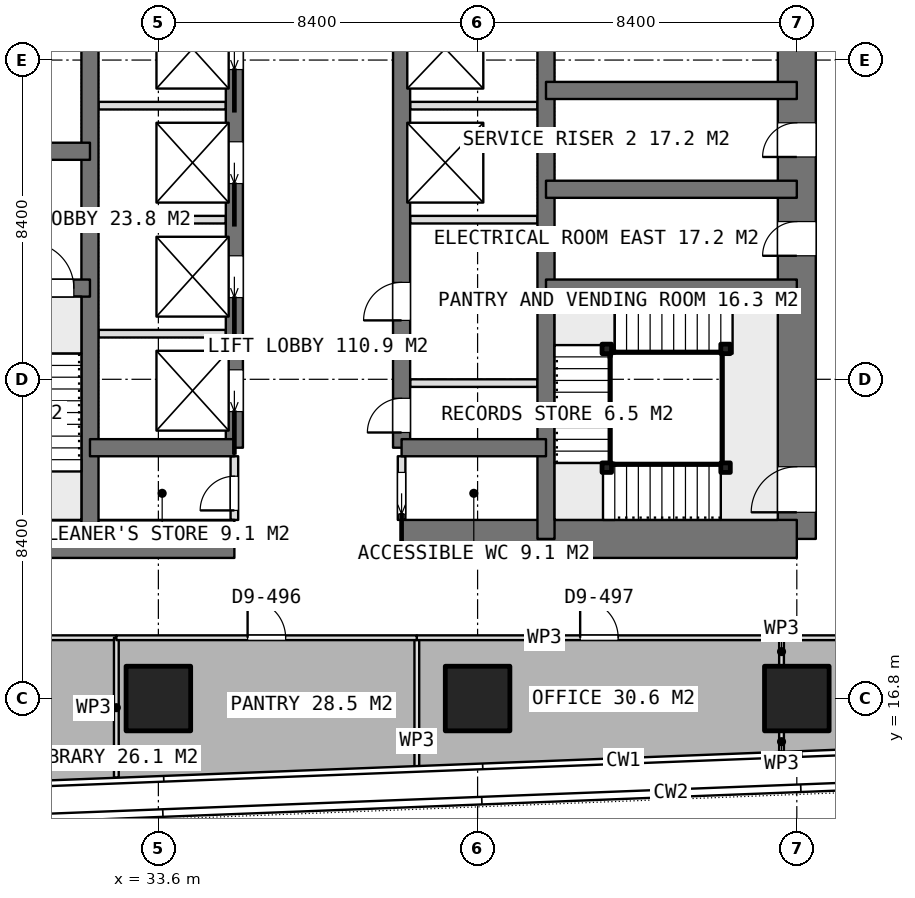
"""IFC4 building model, lengths in metres.
Left out: names, types, materials, properties, quantities, classifications, styles, units other than length and angle.
Written with IfcOpenShell. Run it as: python <this file> out.ifc"""

import sys

from ifc_helpers import new_model, si_unit, direction, frame, frame_2d, origin, origin_2d, place, context, subcontext, project, spatial, rectangle, extrude, element, fill, save


model = new_model("IFC4")
c1 = context("Model", 3, precision=1e-05, world=origin(), true_north=direction((0.0, 1.0)))
c2 = subcontext(c1, "Body", "Model", "MODEL_VIEW")
j1 = project(units=[si_unit("LENGTHUNIT", "METRE"), si_unit("PLANEANGLEUNIT", "RADIAN")], contexts=[c1])
p1 = place(None, origin())
s1 = spatial("IfcSite", under=j1, at=p1, CompositionType="ELEMENT")
p2 = place(p1, origin())
s2 = spatial("IfcBuilding", under=s1, at=p2, CompositionType="ELEMENT")
p3 = place(p2, frame((0.0, 0.0, 129.05)))
s3 = spatial("IfcBuildingStorey", under=s2, at=p3, CompositionType="ELEMENT", Elevation=129.05)
p4 = place(p3, frame((25.2, 21.0, 0.0), z_axis=(0.0, 0.0, 1.0), x_axis=(1.0, 0.0, 0.0)))
e1 = element("IfcWall", 1, at=p4, inside=s3, PredefinedType="SHEAR", context=c2, shape_type="SweptSolid", body=[
    extrude(rectangle(XDim=10.4, YDim=1.0, at=frame_2d((5.2, 0.0))), origin(), (0.0, 0.0, 1.0), 3.75),
])
p5 = place(p3, frame((40.0, 21.0, 0.0), z_axis=(0.0, 0.0, 1.0), x_axis=(1.0, 0.0, 0.0)))
e2 = element("IfcWall", 2, at=p5, inside=s3, PredefinedType="SHEAR", context=c2, shape_type="SweptSolid", body=[
    extrude(rectangle(XDim=10.4, YDim=1.0, at=frame_2d((5.2, 0.0))), origin(), (0.0, 0.0, 1.0), 3.75),
])
p6 = place(p3, frame((50.4, 21.0, 0.0), z_axis=(0.0, 0.0, 1.0), x_axis=(0.0, 1.0, 0.0)))
e3 = element("IfcWall", 3, at=p6, inside=s3, PredefinedType="SHEAR", context=c2, shape_type="SweptSolid", body=[
    extrude(rectangle(XDim=25.2, YDim=1.0, at=frame_2d((12.6, 0.0))), origin(), (0.0, 0.0, 1.0), 3.75),
])
p7 = place(p6, frame((16.2, 0.0, 0.0)))
e4 = element("IfcOpeningElement", 4, at=p7, cuts=e3, PredefinedType="OPENING", context=c2, shape_type="SweptSolid", body=[
    extrude(rectangle(XDim=1.2, YDim=2.1, at=frame_2d((0.6, 1.05))), frame((0.0, 0.51, 0.0), z_axis=(0.0, -1.0, 0.0), x_axis=(1.0, 0.0, 0.0)), (0.0, 0.0, 1.0), 1.02),
])
p8 = place(p6, frame((10.05, 0.0, 0.0)))
e5 = element("IfcOpeningElement", 5, at=p8, cuts=e3, PredefinedType="OPENING", context=c2, shape_type="SweptSolid", body=[
    extrude(rectangle(XDim=0.9, YDim=2.1, at=frame_2d((0.45, 1.05))), frame((0.0, 0.51, 0.0), z_axis=(0.0, -1.0, 0.0), x_axis=(1.0, 0.0, 0.0)), (0.0, 0.0, 1.0), 1.02),
])
p9 = place(p6, frame((7.45, 0.0, 0.0)))
e6 = element("IfcOpeningElement", 6, at=p9, cuts=e3, PredefinedType="OPENING", context=c2, shape_type="SweptSolid", body=[
    extrude(rectangle(XDim=0.9, YDim=2.1, at=frame_2d((0.45, 1.05))), frame((0.0, 0.51, 0.0), z_axis=(0.0, -1.0, 0.0), x_axis=(1.0, 0.0, 0.0)), (0.0, 0.0, 1.0), 1.02),
])
p10 = place(p6, frame((0.7, 0.0, 0.0)))
e7 = element("IfcOpeningElement", 7, at=p10, cuts=e3, PredefinedType="OPENING", context=c2, shape_type="SweptSolid", body=[
    extrude(rectangle(XDim=1.2, YDim=2.1, at=frame_2d((0.6, 1.05))), frame((0.0, 0.51, 0.0), z_axis=(0.0, -1.0, 0.0), x_axis=(1.0, 0.0, 0.0)), (0.0, 0.0, 1.0), 1.02),
])
for number, where, z_axis, x_axis in (
    (8, (31.8, 21.0, 0.0), (0.0, 0.0, 1.0), (0.0, 1.0, 0.0)),
    (9, (43.8, 21.0, 0.0), (0.0, 0.0, 1.0), (0.0, 1.0, 0.0)),
):
    element("IfcWall", number, at=place(p3, frame(where, z_axis=z_axis, x_axis=x_axis)), inside=s3, PredefinedType="SHEAR", context=c2, shape_type="SweptSolid", body=[
        extrude(rectangle(XDim=25.2, YDim=0.45, at=frame_2d((12.6, 0.0))), origin(), (0.0, 0.0, 1.0), 3.75),
    ])
p11 = place(p3, frame((35.6, 23.4, 0.0), z_axis=(0.0, 0.0, 1.0), x_axis=(0.0, 1.0, 0.0)))
e10 = element("IfcWall", 10, at=p11, inside=s3, PredefinedType="SHEAR", context=c2, shape_type="SweptSolid", body=[
    extrude(rectangle(XDim=18.0, YDim=0.45, at=frame_2d((9.0, 0.0))), origin(), (0.0, 0.0, 1.0), 3.75),
])
p12 = place(p11, frame((0.95, 0.0, 0.0)))
e11 = element("IfcOpeningElement", 11, at=p12, cuts=e10, PredefinedType="OPENING", context=c2, shape_type="SweptSolid", body=[
    extrude(rectangle(XDim=1.1, YDim=2.1, at=frame_2d((0.55, 1.05))), frame((0.0, 0.235, 0.0), z_axis=(0.0, -1.0, 0.0), x_axis=(1.0, 0.0, 0.0)), (0.0, 0.0, 1.0), 0.47),
])
p13 = place(p11, frame((3.95, 0.0, 0.0)))
e12 = element("IfcOpeningElement", 12, at=p13, cuts=e10, PredefinedType="OPENING", context=c2, shape_type="SweptSolid", body=[
    extrude(rectangle(XDim=1.1, YDim=2.1, at=frame_2d((0.55, 1.05))), frame((0.0, 0.235, 0.0), z_axis=(0.0, -1.0, 0.0), x_axis=(1.0, 0.0, 0.0)), (0.0, 0.0, 1.0), 0.47),
])
p14 = place(p11, frame((6.95, 0.0, 0.0)))
e13 = element("IfcOpeningElement", 13, at=p14, cuts=e10, PredefinedType="OPENING", context=c2, shape_type="SweptSolid", body=[
    extrude(rectangle(XDim=1.1, YDim=2.1, at=frame_2d((0.55, 1.05))), frame((0.0, 0.235, 0.0), z_axis=(0.0, -1.0, 0.0), x_axis=(1.0, 0.0, 0.0)), (0.0, 0.0, 1.0), 0.47),
])
p15 = place(p11, frame((9.95, 0.0, 0.0)))
e14 = element("IfcOpeningElement", 14, at=p15, cuts=e10, PredefinedType="OPENING", context=c2, shape_type="SweptSolid", body=[
    extrude(rectangle(XDim=1.1, YDim=2.1, at=frame_2d((0.55, 1.05))), frame((0.0, 0.235, 0.0), z_axis=(0.0, -1.0, 0.0), x_axis=(1.0, 0.0, 0.0)), (0.0, 0.0, 1.0), 0.47),
])
p16 = place(p11, frame((12.95, 0.0, 0.0)))
e15 = element("IfcOpeningElement", 15, at=p16, cuts=e10, PredefinedType="OPENING", context=c2, shape_type="SweptSolid", body=[
    extrude(rectangle(XDim=1.1, YDim=2.1, at=frame_2d((0.55, 1.05))), frame((0.0, 0.235, 0.0), z_axis=(0.0, -1.0, 0.0), x_axis=(1.0, 0.0, 0.0)), (0.0, 0.0, 1.0), 0.47),
])
p17 = place(p11, frame((15.95, 0.0, 0.0)))
e16 = element("IfcOpeningElement", 16, at=p17, cuts=e10, PredefinedType="OPENING", context=c2, shape_type="SweptSolid", body=[
    extrude(rectangle(XDim=1.1, YDim=2.1, at=frame_2d((0.55, 1.05))), frame((0.0, 0.235, 0.0), z_axis=(0.0, -1.0, 0.0), x_axis=(1.0, 0.0, 0.0)), (0.0, 0.0, 1.0), 0.47),
])
p18 = place(p3, frame((40.0, 23.4, 0.0), z_axis=(0.0, 0.0, 1.0), x_axis=(0.0, 1.0, 0.0)))
e17 = element("IfcWall", 17, at=p18, inside=s3, PredefinedType="SHEAR", context=c2, shape_type="SweptSolid", body=[
    extrude(rectangle(XDim=18.0, YDim=0.45, at=frame_2d((9.0, 0.0))), origin(), (0.0, 0.0, 1.0), 3.75),
])
p19 = place(p18, frame((0.4, 0.0, 0.0)))
e18 = element("IfcOpeningElement", 18, at=p19, cuts=e17, PredefinedType="OPENING", context=c2, shape_type="SweptSolid", body=[
    extrude(rectangle(XDim=0.9, YDim=2.1, at=frame_2d((0.45, 1.05))), frame((0.0, 0.235, 0.0), z_axis=(0.0, -1.0, 0.0), x_axis=(1.0, 0.0, 0.0)), (0.0, 0.0, 1.0), 0.47),
])
p20 = place(p18, frame((3.35, 0.0, 0.0)))
e19 = element("IfcOpeningElement", 19, at=p20, cuts=e17, PredefinedType="OPENING", context=c2, shape_type="SweptSolid", body=[
    extrude(rectangle(XDim=1.0, YDim=2.1, at=frame_2d((0.5, 1.05))), frame((0.0, 0.235, 0.0), z_axis=(0.0, -1.0, 0.0), x_axis=(1.0, 0.0, 0.0)), (0.0, 0.0, 1.0), 0.47),
])
for number, where, z_axis, x_axis in (
    (20, (31.8, 23.4, 0.0), (0.0, 0.0, 1.0), (1.0, 0.0, 0.0)),
    (21, (40.0, 23.4, 0.0), (0.0, 0.0, 1.0), (1.0, 0.0, 0.0)),
):
    element("IfcWall", number, at=place(p3, frame(where, z_axis=z_axis, x_axis=x_axis)), inside=s3, PredefinedType="SHEAR", context=c2, shape_type="SweptSolid", body=[
        extrude(rectangle(XDim=3.8, YDim=0.45, at=frame_2d((1.9, 0.0))), origin(), (0.0, 0.0, 1.0), 3.75),
    ])
p21 = place(p3, frame((25.2, 27.6, 0.0), z_axis=(0.0, 0.0, 1.0), x_axis=(1.0, 0.0, 0.0)))
e22 = element("IfcWall", 22, at=p21, inside=s3, PredefinedType="SHEAR", context=c2, shape_type="SweptSolid", body=[
    extrude(rectangle(XDim=6.6, YDim=0.45, at=frame_2d((3.3, 0.0))), origin(), (0.0, 0.0, 1.0), 3.75),
])
p22 = place(p21, frame((4.975, 0.0, 0.0)))
e23 = element("IfcOpeningElement", 23, at=p22, cuts=e22, PredefinedType="OPENING", context=c2, shape_type="SweptSolid", body=[
    extrude(rectangle(XDim=1.2, YDim=2.1, at=frame_2d((0.6, 1.05))), frame((0.0, 0.235, 0.0), z_axis=(0.0, -1.0, 0.0), x_axis=(1.0, 0.0, 0.0)), (0.0, 0.0, 1.0), 0.47),
])
p23 = place(p3, frame((25.2, 31.2, 0.0), z_axis=(0.0, 0.0, 1.0), x_axis=(1.0, 0.0, 0.0)))
e24 = element("IfcWall", 24, at=p23, inside=s3, PredefinedType="SHEAR", context=c2, shape_type="SweptSolid", body=[
    extrude(rectangle(XDim=6.6, YDim=0.45, at=frame_2d((3.3, 0.0))), origin(), (0.0, 0.0, 1.0), 3.75),
])
p24 = place(p23, frame((2.65, 0.0, 0.0)))
e25 = element("IfcOpeningElement", 25, at=p24, cuts=e24, PredefinedType="OPENING", context=c2, shape_type="SweptSolid", body=[
    extrude(rectangle(XDim=1.3, YDim=2.1, at=frame_2d((0.65, 1.05))), frame((0.0, 0.235, 0.0), z_axis=(0.0, -1.0, 0.0), x_axis=(1.0, 0.0, 0.0)), (0.0, 0.0, 1.0), 0.47),
])
for number, where, z_axis, x_axis in (
    (26, (43.8, 27.6, 0.0), (0.0, 0.0, 1.0), (1.0, 0.0, 0.0)),
    (27, (43.8, 30.2, 0.0), (0.0, 0.0, 1.0), (1.0, 0.0, 0.0)),
    (28, (43.8, 32.8, 0.0), (0.0, 0.0, 1.0), (1.0, 0.0, 0.0)),
):
    element("IfcWall", number, at=place(p3, frame(where, z_axis=z_axis, x_axis=x_axis)), inside=s3, PredefinedType="SHEAR", context=c2, shape_type="SweptSolid", body=[
        extrude(rectangle(XDim=6.6, YDim=0.45, at=frame_2d((3.3, 0.0))), origin(), (0.0, 0.0, 1.0), 3.75),
    ])
for number, where, z_axis, x_axis in (
    (29, (33.6, 16.8, 0.0), (0.0, 0.0, 1.0), (1.0, 0.0, 0.0)),
    (30, (42.0, 16.8, 0.0), (0.0, 0.0, 1.0), (1.0, 0.0, 0.0)),
    (31, (50.4, 16.8, 0.0), (0.0, 0.0, 1.0), (1.0, 0.0, 0.0)),
):
    element("IfcColumn", number, at=place(p3, frame(where, z_axis=z_axis, x_axis=x_axis)), inside=s3, PredefinedType="COLUMN", context=c2, shape_type="SweptSolid", body=[
        extrude(rectangle(XDim=1.7, YDim=1.7, at=origin_2d()), origin(), (0.0, 0.0, 1.0), 3.75),
    ])
for number, where, z_axis, x_axis in (
    (32, (32.025, 26.4, 0.0), (0.0, 0.0, 1.0), (1.0, 0.0, 0.0)),
    (33, (32.025, 29.4, 0.0), (0.0, 0.0, 1.0), (1.0, 0.0, 0.0)),
    (34, (32.025, 32.4, 0.0), (0.0, 0.0, 1.0), (1.0, 0.0, 0.0)),
):
    element("IfcWall", number, at=place(p3, frame(where, z_axis=z_axis, x_axis=x_axis)), inside=s3, PredefinedType="PARTITIONING", context=c2, shape_type="SweptSolid", body=[
        extrude(rectangle(XDim=3.35, YDim=0.2, at=frame_2d((1.675, 0.0))), origin(), (0.0, 0.0, 1.0), 3.5),
    ])
for number, where, z_axis, x_axis in (
    (35, (40.225, 29.4, 0.0), (0.0, 0.0, 1.0), (1.0, 0.0, 0.0)),
    (36, (40.225, 32.4, 0.0), (0.0, 0.0, 1.0), (1.0, 0.0, 0.0)),
):
    element("IfcWall", number, at=place(p3, frame(where, z_axis=z_axis, x_axis=x_axis)), inside=s3, PredefinedType="PARTITIONING", context=c2, shape_type="SweptSolid", body=[
        extrude(rectangle(XDim=3.35, YDim=0.2, at=frame_2d((1.675, 0.0))), origin(), (0.0, 0.0, 1.0), 3.5),
    ])
p25 = place(p3, frame((40.0, 21.5, 0.0), z_axis=(0.0, 0.0, 1.0), x_axis=(0.0, 1.0, 0.0)))
e37 = element("IfcWall", 37, at=p25, inside=s3, PredefinedType="PARTITIONING", context=c2, shape_type="SweptSolid", body=[
    extrude(rectangle(XDim=1.675, YDim=0.2, at=frame_2d((0.837, 0.0))), origin(), (0.0, 0.0, 1.0), 3.5),
])
p26 = place(p25, frame((0.15, 0.0, 0.0)))
e38 = element("IfcOpeningElement", 38, at=p26, cuts=e37, PredefinedType="OPENING", context=c2, shape_type="SweptSolid", body=[
    extrude(rectangle(XDim=1.1, YDim=2.1, at=frame_2d((0.55, 1.05))), frame((0.0, 0.11, 0.0), z_axis=(0.0, -1.0, 0.0), x_axis=(1.0, 0.0, 0.0)), (0.0, 0.0, 1.0), 0.22),
])
p27 = place(p3, frame((35.6, 21.5, 0.0), z_axis=(0.0, 0.0, 1.0), x_axis=(0.0, 1.0, 0.0)))
e39 = element("IfcWall", 39, at=p27, inside=s3, PredefinedType="PARTITIONING", context=c2, shape_type="SweptSolid", body=[
    extrude(rectangle(XDim=1.675, YDim=0.2, at=frame_2d((0.837, 0.0))), origin(), (0.0, 0.0, 1.0), 3.5),
])
p28 = place(p27, frame((0.25, 0.0, 0.0)))
e40 = element("IfcOpeningElement", 40, at=p28, cuts=e39, PredefinedType="OPENING", context=c2, shape_type="SweptSolid", body=[
    extrude(rectangle(XDim=0.9, YDim=2.1, at=frame_2d((0.45, 1.05))), frame((0.0, 0.11, 0.0), z_axis=(0.0, -1.0, 0.0), x_axis=(1.0, 0.0, 0.0)), (0.0, 0.0, 1.0), 0.22),
])
p29 = place(p3, frame((40.225, 25.1, 0.0), z_axis=(0.0, 0.0, 1.0), x_axis=(1.0, 0.0, 0.0)))
e41 = element("IfcWall", 41, at=p29, inside=s3, PredefinedType="PARTITIONING", context=c2, shape_type="SweptSolid", body=[
    extrude(rectangle(XDim=3.35, YDim=0.2, at=frame_2d((1.675, 0.0))), origin(), (0.0, 0.0, 1.0), 3.5),
])
p30 = place(p3, frame((40.401, 14.998, 0.0), z_axis=(0.0, 0.0, 1.0), x_axis=(0.0, 1.0, 0.0)))
e42 = element("IfcWall", 42, at=p30, inside=s3, PredefinedType="PARTITIONING", context=c2, shape_type="SweptSolid", body=[
    extrude(rectangle(XDim=3.402, YDim=0.125, at=frame_2d((1.701, 0.0))), origin(), (0.0, 0.0, 1.0), 3.5),
])
p31 = place(p3, frame((40.401, 18.4, 0.0), z_axis=(0.0, 0.0, 1.0), x_axis=(1.0, 0.0, 0.0)))
e43 = element("IfcWall", 43, at=p31, inside=s3, PredefinedType="PARTITIONING", context=c2, shape_type="SweptSolid", body=[
    extrude(rectangle(XDim=9.597, YDim=0.125, at=frame_2d((4.799, 0.0))), origin(), (0.0, 0.0, 1.0), 3.5),
])
p32 = place(p31, frame((4.298, 0.0, 0.0)))
e44 = element("IfcOpeningElement", 44, at=p32, cuts=e43, PredefinedType="OPENING", context=c2, shape_type="SweptSolid", body=[
    extrude(rectangle(XDim=1.0, YDim=2.1, at=frame_2d((0.5, 1.05))), frame((0.0, 0.073, 0.0), z_axis=(0.0, -1.0, 0.0), x_axis=(1.0, 0.0, 0.0)), (0.0, 0.0, 1.0), 0.145),
])
p33 = place(p3, frame((49.998, 18.4, 0.0), z_axis=(0.0, 0.0, 1.0), x_axis=(0.0, -1.0, 0.0)))
e45 = element("IfcWall", 45, at=p33, inside=s3, PredefinedType="PARTITIONING", context=c2, shape_type="SweptSolid", body=[
    extrude(rectangle(XDim=0.73, YDim=0.125, at=frame_2d((0.365, 0.0))), origin(), (0.0, 0.0, 1.0), 3.5),
])
p34 = place(p3, frame((49.998, 15.93, 0.0), z_axis=(0.0, 0.0, 1.0), x_axis=(0.0, -1.0, 0.0)))
e46 = element("IfcWall", 46, at=p34, inside=s3, PredefinedType="PARTITIONING", context=c2, shape_type="SweptSolid", body=[
    extrude(rectangle(XDim=0.529, YDim=0.125, at=frame_2d((0.265, 0.0))), origin(), (0.0, 0.0, 1.0), 3.5),
])
p35 = place(p3, frame((49.998, 18.4, 0.0), z_axis=(0.0, 0.0, 1.0), x_axis=(1.0, 0.0, 0.0)))
e47 = element("IfcWall", 47, at=p35, inside=s3, PredefinedType="PARTITIONING", context=c2, shape_type="SweptSolid", body=[
    extrude(rectangle(XDim=6.402, YDim=0.125, at=frame_2d((3.201, 0.0))), origin(), (0.0, 0.0, 1.0), 3.5),
])
p36 = place(p35, frame((2.301, 0.0, 0.0)))
e48 = element("IfcOpeningElement", 48, at=p36, cuts=e47, PredefinedType="OPENING", context=c2, shape_type="SweptSolid", body=[
    extrude(rectangle(XDim=1.8, YDim=2.1, at=frame_2d((0.9, 1.05))), frame((0.0, 0.073, 0.0), z_axis=(0.0, -1.0, 0.0), x_axis=(1.0, 0.0, 0.0)), (0.0, 0.0, 1.0), 0.145),
])
p37 = place(p3, frame((25.601, 18.4, 0.0), z_axis=(0.0, 0.0, 1.0), x_axis=(1.0, 0.0, 0.0)))
e49 = element("IfcWall", 49, at=p37, inside=s3, PredefinedType="PARTITIONING", context=c2, shape_type="SweptSolid", body=[
    extrude(rectangle(XDim=6.893, YDim=0.125, at=frame_2d((3.446, 0.0))), origin(), (0.0, 0.0, 1.0), 3.5),
])
p38 = place(p37, frame((2.947, 0.0, 0.0)))
e50 = element("IfcOpeningElement", 50, at=p38, cuts=e49, PredefinedType="OPENING", context=c2, shape_type="SweptSolid", body=[
    extrude(rectangle(XDim=1.0, YDim=2.1, at=frame_2d((0.5, 1.05))), frame((0.0, 0.073, 0.0), z_axis=(0.0, -1.0, 0.0), x_axis=(1.0, 0.0, 0.0)), (0.0, 0.0, 1.0), 0.145),
])
p39 = place(p3, frame((32.494, 18.4, 0.0), z_axis=(0.0, 0.0, 1.0), x_axis=(0.0, -1.0, 0.0)))
e51 = element("IfcWall", 51, at=p39, inside=s3, PredefinedType="PARTITIONING", context=c2, shape_type="SweptSolid", body=[
    extrude(rectangle(XDim=3.68, YDim=0.125, at=frame_2d((1.84, 0.0))), origin(), (0.0, 0.0, 1.0), 3.5),
])
p40 = place(p3, frame((32.495, 18.4, 0.0), z_axis=(0.0, 0.0, 1.0), x_axis=(1.0, 0.0, 0.0)))
e52 = element("IfcWall", 52, at=p40, inside=s3, PredefinedType="PARTITIONING", context=c2, shape_type="SweptSolid", body=[
    extrude(rectangle(XDim=7.905, YDim=0.125, at=frame_2d((3.952, 0.0))), origin(), (0.0, 0.0, 1.0), 3.5),
])
p41 = place(p40, frame((3.453, 0.0, 0.0)))
e53 = element("IfcOpeningElement", 53, at=p41, cuts=e52, PredefinedType="OPENING", context=c2, shape_type="SweptSolid", body=[
    extrude(rectangle(XDim=1.0, YDim=2.1, at=frame_2d((0.5, 1.05))), frame((0.0, 0.073, 0.0), z_axis=(0.0, -1.0, 0.0), x_axis=(1.0, 0.0, 0.0)), (0.0, 0.0, 1.0), 0.145),
])
for number, where, z_axis, x_axis in (
    (54, (48.525, 22.875, 0.0), (0.0, 0.0, 1.0), (1.0, 0.0, 0.0)),
    (55, (45.4, 22.875, 0.0), (0.0, 0.0, 1.0), (1.0, 0.0, 0.0)),
    (56, (45.4, 26.0, 0.0), (0.0, 0.0, 1.0), (1.0, 0.0, 0.0)),
    (57, (48.525, 26.0, 0.0), (0.0, 0.0, 1.0), (1.0, 0.0, 0.0)),
):
    element("IfcColumn", number, at=place(p3, frame(where, z_axis=z_axis, x_axis=x_axis)), inside=s3, PredefinedType="COLUMN", context=c2, shape_type="SweptSolid", body=[
        extrude(rectangle(XDim=0.25, YDim=0.25, at=origin_2d()), origin(), (0.0, 0.0, 1.0), 3.75),
    ])
p42 = place(p8, origin())
e58 = element("IfcDoor", 58, at=p42, inside=s3, OperationType="SINGLE_SWING_LEFT", PredefinedType="DOOR", context=c2, shape_type="SweptSolid", body=[
    extrude(rectangle(XDim=0.9, YDim=2.1, at=frame_2d((0.45, 1.05))), frame((0.0, 0.025, 0.0), z_axis=(0.0, -1.0, 0.0), x_axis=(1.0, 0.0, 0.0)), (0.0, 0.0, 1.0), 0.05),
])
fill(e5, e58)
p43 = place(p9, origin())
e59 = element("IfcDoor", 59, at=p43, inside=s3, OperationType="SINGLE_SWING_LEFT", PredefinedType="DOOR", context=c2, shape_type="SweptSolid", body=[
    extrude(rectangle(XDim=0.9, YDim=2.1, at=frame_2d((0.45, 1.05))), frame((0.0, 0.025, 0.0), z_axis=(0.0, -1.0, 0.0), x_axis=(1.0, 0.0, 0.0)), (0.0, 0.0, 1.0), 0.05),
])
fill(e6, e59)
p44 = place(p26, origin())
e60 = element("IfcDoor", 60, at=p44, inside=s3, OperationType="SLIDING_TO_LEFT", PredefinedType="DOOR", context=c2, shape_type="SweptSolid", body=[
    extrude(rectangle(XDim=1.1, YDim=2.1, at=frame_2d((0.55, 1.05))), frame((0.0, 0.025, 0.0), z_axis=(0.0, -1.0, 0.0), x_axis=(1.0, 0.0, 0.0)), (0.0, 0.0, 1.0), 0.05),
])
fill(e38, e60)
p45 = place(p28, origin())
e61 = element("IfcDoor", 61, at=p45, inside=s3, OperationType="SINGLE_SWING_LEFT", PredefinedType="DOOR", context=c2, shape_type="SweptSolid", body=[
    extrude(rectangle(XDim=0.9, YDim=2.1, at=frame_2d((0.45, 1.05))), frame((0.0, 0.025, 0.0), z_axis=(0.0, -1.0, 0.0), x_axis=(1.0, 0.0, 0.0)), (0.0, 0.0, 1.0), 0.05),
])
fill(e40, e61)
p46 = place(p19, origin())
e62 = element("IfcDoor", 62, at=p46, inside=s3, OperationType="SINGLE_SWING_LEFT", PredefinedType="DOOR", context=c2, shape_type="SweptSolid", body=[
    extrude(rectangle(XDim=0.9, YDim=2.1, at=frame_2d((0.45, 1.05))), frame((0.0, 0.025, 0.0), z_axis=(0.0, -1.0, 0.0), x_axis=(1.0, 0.0, 0.0)), (0.0, 0.0, 1.0), 0.05),
])
fill(e18, e62)
p47 = place(p20, origin())
e63 = element("IfcDoor", 63, at=p47, inside=s3, OperationType="SINGLE_SWING_LEFT", PredefinedType="DOOR", context=c2, shape_type="SweptSolid", body=[
    extrude(rectangle(XDim=1.0, YDim=2.1, at=frame_2d((0.5, 1.05))), frame((0.0, 0.025, 0.0), z_axis=(0.0, -1.0, 0.0), x_axis=(1.0, 0.0, 0.0)), (0.0, 0.0, 1.0), 0.05),
])
fill(e19, e63)
p48 = place(p12, origin())
e64 = element("IfcDoor", 64, at=p48, inside=s3, OperationType="SLIDING_TO_LEFT", PredefinedType="USERDEFINED", context=c2, shape_type="SweptSolid", body=[
    extrude(rectangle(XDim=1.1, YDim=2.1, at=frame_2d((0.55, 1.05))), frame((0.0, 0.025, 0.0), z_axis=(0.0, -1.0, 0.0), x_axis=(1.0, 0.0, 0.0)), (0.0, 0.0, 1.0), 0.05),
])
fill(e11, e64)
p49 = place(p13, origin())
e65 = element("IfcDoor", 65, at=p49, inside=s3, OperationType="SLIDING_TO_LEFT", PredefinedType="USERDEFINED", context=c2, shape_type="SweptSolid", body=[
    extrude(rectangle(XDim=1.1, YDim=2.1, at=frame_2d((0.55, 1.05))), frame((0.0, 0.025, 0.0), z_axis=(0.0, -1.0, 0.0), x_axis=(1.0, 0.0, 0.0)), (0.0, 0.0, 1.0), 0.05),
])
fill(e12, e65)
p50 = place(p14, origin())
e66 = element("IfcDoor", 66, at=p50, inside=s3, OperationType="SLIDING_TO_LEFT", PredefinedType="USERDEFINED", context=c2, shape_type="SweptSolid", body=[
    extrude(rectangle(XDim=1.1, YDim=2.1, at=frame_2d((0.55, 1.05))), frame((0.0, 0.025, 0.0), z_axis=(0.0, -1.0, 0.0), x_axis=(1.0, 0.0, 0.0)), (0.0, 0.0, 1.0), 0.05),
])
fill(e13, e66)
p51 = place(p15, origin())
e67 = element("IfcDoor", 67, at=p51, inside=s3, OperationType="SLIDING_TO_LEFT", PredefinedType="USERDEFINED", context=c2, shape_type="SweptSolid", body=[
    extrude(rectangle(XDim=1.1, YDim=2.1, at=frame_2d((0.55, 1.05))), frame((0.0, 0.025, 0.0), z_axis=(0.0, -1.0, 0.0), x_axis=(1.0, 0.0, 0.0)), (0.0, 0.0, 1.0), 0.05),
])
fill(e14, e67)
p52 = place(p32, origin())
e68 = element("IfcDoor", 68, at=p52, inside=s3, OperationType="SINGLE_SWING_LEFT", PredefinedType="DOOR", context=c2, shape_type="SweptSolid", body=[
    extrude(rectangle(XDim=1.0, YDim=2.1, at=frame_2d((0.5, 1.05))), frame((0.0, 0.025, 0.0), z_axis=(0.0, -1.0, 0.0), x_axis=(1.0, 0.0, 0.0)), (0.0, 0.0, 1.0), 0.05),
])
fill(e44, e68)
p53 = place(p41, origin())
e69 = element("IfcDoor", 69, at=p53, inside=s3, OperationType="SINGLE_SWING_LEFT", PredefinedType="DOOR", context=c2, shape_type="SweptSolid", body=[
    extrude(rectangle(XDim=1.0, YDim=2.1, at=frame_2d((0.5, 1.05))), frame((0.0, 0.025, 0.0), z_axis=(0.0, -1.0, 0.0), x_axis=(1.0, 0.0, 0.0)), (0.0, 0.0, 1.0), 0.05),
])
fill(e53, e69)
p54 = place(p22, origin())
e70 = element("IfcDoor", 70, at=p54, inside=s3, OperationType="SINGLE_SWING_RIGHT", PredefinedType="DOOR", context=c2, shape_type="SweptSolid", body=[
    extrude(rectangle(XDim=1.2, YDim=2.1, at=frame_2d((0.6, 1.05))), frame((0.0, 0.025, 0.0), z_axis=(0.0, -1.0, 0.0), x_axis=(1.0, 0.0, 0.0)), (0.0, 0.0, 1.0), 0.05),
])
fill(e23, e70)
p55 = place(p10, origin())
e71 = element("IfcDoor", 71, at=p55, inside=s3, OperationType="SINGLE_SWING_RIGHT", PredefinedType="DOOR", context=c2, shape_type="SweptSolid", body=[
    extrude(rectangle(XDim=1.2, YDim=2.1, at=frame_2d((0.6, 1.05))), frame((0.0, 0.025, 0.0), z_axis=(0.0, -1.0, 0.0), x_axis=(1.0, 0.0, 0.0)), (0.0, 0.0, 1.0), 0.05),
])
fill(e7, e71)
save(model, sys.argv[1])
